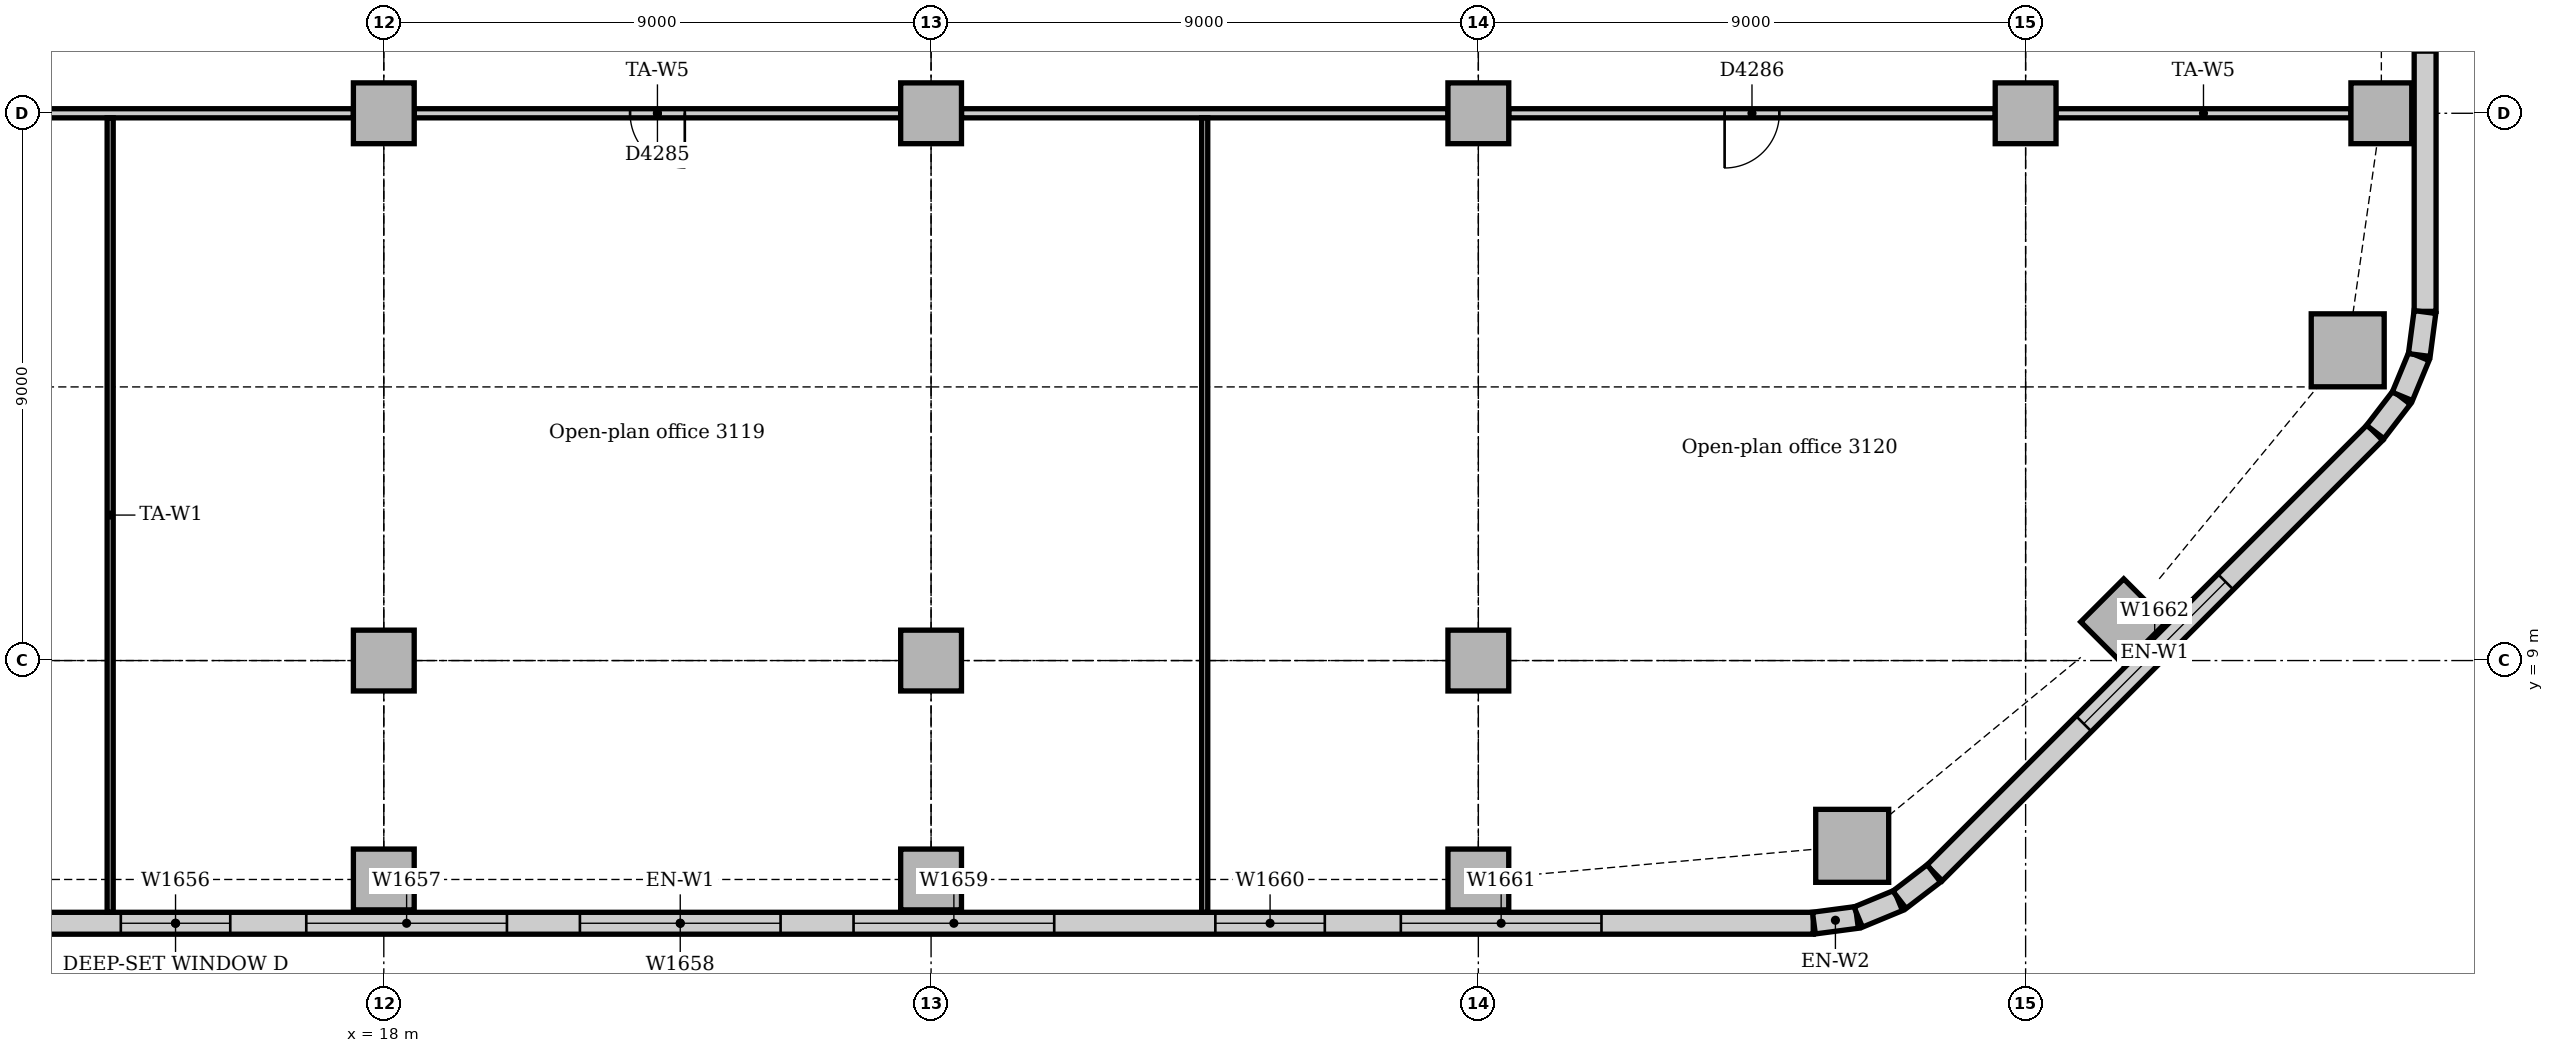
"""IFC4 building model, lengths in metres.
Left out: names, types, materials, properties, quantities, classifications, styles, units other than length and angle.
Written with IfcOpenShell. Run it as: python <this file> out.ifc"""

import sys

from ifc_helpers import new_model, si_unit, direction, frame, frame_2d, origin, origin_2d, place, context, subcontext, project, spatial, rectangle, extrude, element, fill, save


model = new_model("IFC4")
c1 = context("Model", 3, precision=1e-05, world=origin(), true_north=direction((0.0, 1.0)))
c2 = subcontext(c1, "Body", "Model", "MODEL_VIEW")
j1 = project(units=[si_unit("LENGTHUNIT", "METRE"), si_unit("PLANEANGLEUNIT", "RADIAN")], contexts=[c1])
p1 = place(None, origin())
s1 = spatial("IfcSite", under=j1, at=p1, CompositionType="ELEMENT")
p2 = place(p1, origin())
s2 = spatial("IfcBuilding", under=s1, at=p2, CompositionType="ELEMENT")
p3 = place(p2, frame((0.0, 0.0, 132.0)))
s3 = spatial("IfcBuildingStorey", under=s2, at=p3, CompositionType="ELEMENT", Elevation=132.0)
for number, where, z_axis, x_axis in (
    (1, (42.148, 5.953, 0.0), (0.0, 0.0, 1.0), (1.0, 0.0, 0.0)),
    (2, (50.297, 14.102, 0.0), (0.0, 0.0, 1.0), (1.0, 0.0, 0.0)),
):
    element("IfcColumn", number, at=place(p3, frame(where, z_axis=z_axis, x_axis=x_axis)), inside=s3, PredefinedType="COLUMN", context=c2, shape_type="SweptSolid", body=[
        extrude(rectangle(XDim=1.2, YDim=1.2, at=origin_2d()), origin(), (0.0, 0.0, 1.0), 3.85),
    ])
for number, where, z_axis, x_axis in (
    (3, (18.0, 5.4, 0.0), (0.0, 0.0, 1.0), (1.0, 0.0, 0.0)),
    (4, (27.0, 5.4, 0.0), (0.0, 0.0, 1.0), (1.0, 0.0, 0.0)),
    (5, (36.0, 5.4, 0.0), (0.0, 0.0, 1.0), (1.0, 0.0, 0.0)),
    (6, (46.614, 9.636, 0.0), (0.0, 0.0, 1.0), (0.707, 0.707, 0.0)),
    (7, (50.85, 18.0, 0.0), (0.0, 0.0, 1.0), (1.0, 0.0, 0.0)),
    (8, (18.0, 9.0, 0.0), (0.0, 0.0, 1.0), (1.0, 0.0, 0.0)),
    (9, (18.0, 18.0, 0.0), (0.0, 0.0, 1.0), (1.0, 0.0, 0.0)),
    (10, (27.0, 9.0, 0.0), (0.0, 0.0, 1.0), (1.0, 0.0, 0.0)),
    (11, (27.0, 18.0, 0.0), (0.0, 0.0, 1.0), (1.0, 0.0, 0.0)),
    (12, (36.0, 9.0, 0.0), (0.0, 0.0, 1.0), (1.0, 0.0, 0.0)),
    (13, (36.0, 18.0, 0.0), (0.0, 0.0, 1.0), (1.0, 0.0, 0.0)),
    (14, (45.0, 18.0, 0.0), (0.0, 0.0, 1.0), (1.0, 0.0, 0.0)),
):
    element("IfcColumn", number, at=place(p3, frame(where, z_axis=z_axis, x_axis=x_axis)), inside=s3, PredefinedType="COLUMN", context=c2, shape_type="SweptSolid", body=[
        extrude(rectangle(XDim=1.0, YDim=1.0, at=origin_2d()), origin(), (0.0, 0.0, 1.0), 3.85),
    ])
p4 = place(p3, frame((4.243, 4.68, 0.0), z_axis=(0.0, 0.0, 1.0), x_axis=(1.0, 0.0, 0.0)))
e15 = element("IfcWall", 15, at=p4, inside=s3, PredefinedType="STANDARD", context=c2, shape_type="SweptSolid", body=[
    extrude(rectangle(XDim=37.265, YDim=0.36, at=frame_2d((18.632, 0.0))), origin(), (0.0, 0.0, 1.0), 3.85),
])
p5 = place(p4, frame((3.482, 0.0, 0.9)))
e16 = element("IfcOpeningElement", 16, at=p5, cuts=e15, PredefinedType="OPENING", context=c2, shape_type="SweptSolid", body=[
    extrude(rectangle(XDim=3.3, YDim=1.6, at=frame_2d((1.65, 0.8))), frame((0.0, 0.19, 0.0), z_axis=(0.0, -1.0, 0.0), x_axis=(1.0, 0.0, 0.0)), (0.0, 0.0, 1.0), 0.38),
])
p6 = place(p4, frame((9.432, 0.0, 0.9)))
e17 = element("IfcOpeningElement", 17, at=p6, cuts=e15, PredefinedType="OPENING", context=c2, shape_type="SweptSolid", body=[
    extrude(rectangle(XDim=1.8, YDim=1.6, at=frame_2d((0.9, 0.8))), frame((0.0, 0.19, 0.0), z_axis=(0.0, -1.0, 0.0), x_axis=(1.0, 0.0, 0.0)), (0.0, 0.0, 1.0), 0.38),
])
p7 = place(p4, frame((12.482, 0.0, 0.9)))
e18 = element("IfcOpeningElement", 18, at=p7, cuts=e15, PredefinedType="OPENING", context=c2, shape_type="SweptSolid", body=[
    extrude(rectangle(XDim=3.3, YDim=1.6, at=frame_2d((1.65, 0.8))), frame((0.0, 0.19, 0.0), z_axis=(0.0, -1.0, 0.0), x_axis=(1.0, 0.0, 0.0)), (0.0, 0.0, 1.0), 0.38),
])
p8 = place(p4, frame((16.982, 0.0, 0.9)))
e19 = element("IfcOpeningElement", 19, at=p8, cuts=e15, PredefinedType="OPENING", context=c2, shape_type="SweptSolid", body=[
    extrude(rectangle(XDim=3.3, YDim=1.6, at=frame_2d((1.65, 0.8))), frame((0.0, 0.19, 0.0), z_axis=(0.0, -1.0, 0.0), x_axis=(1.0, 0.0, 0.0)), (0.0, 0.0, 1.0), 0.38),
])
p9 = place(p4, frame((21.482, 0.0, 0.9)))
e20 = element("IfcOpeningElement", 20, at=p9, cuts=e15, PredefinedType="OPENING", context=c2, shape_type="SweptSolid", body=[
    extrude(rectangle(XDim=3.3, YDim=1.6, at=frame_2d((1.65, 0.8))), frame((0.0, 0.19, 0.0), z_axis=(0.0, -1.0, 0.0), x_axis=(1.0, 0.0, 0.0)), (0.0, 0.0, 1.0), 0.38),
])
p10 = place(p4, frame((27.432, 0.0, 0.9)))
e21 = element("IfcOpeningElement", 21, at=p10, cuts=e15, PredefinedType="OPENING", context=c2, shape_type="SweptSolid", body=[
    extrude(rectangle(XDim=1.8, YDim=1.6, at=frame_2d((0.9, 0.8))), frame((0.0, 0.19, 0.0), z_axis=(0.0, -1.0, 0.0), x_axis=(1.0, 0.0, 0.0)), (0.0, 0.0, 1.0), 0.38),
])
p11 = place(p4, frame((30.482, 0.0, 0.9)))
e22 = element("IfcOpeningElement", 22, at=p11, cuts=e15, PredefinedType="OPENING", context=c2, shape_type="SweptSolid", body=[
    extrude(rectangle(XDim=3.3, YDim=1.6, at=frame_2d((1.65, 0.8))), frame((0.0, 0.19, 0.0), z_axis=(0.0, -1.0, 0.0), x_axis=(1.0, 0.0, 0.0)), (0.0, 0.0, 1.0), 0.38),
])
p12 = place(p3, frame((43.501, 5.506, 0.0), z_axis=(0.0, 0.0, 1.0), x_axis=(0.707106781187, 0.707106781187, 0.0)))
e23 = element("IfcWall", 23, at=p12, inside=s3, PredefinedType="STANDARD", context=c2, shape_type="SweptSolid", body=[
    extrude(rectangle(XDim=10.243, YDim=0.36, at=frame_2d((5.121, 0.0))), origin(), (0.0, 0.0, 1.0), 3.85),
])
p13 = place(p12, frame((3.471, 0.0, 0.9)))
e24 = element("IfcOpeningElement", 24, at=p13, cuts=e23, PredefinedType="OPENING", context=c2, shape_type="SweptSolid", body=[
    extrude(rectangle(XDim=3.3, YDim=1.6, at=frame_2d((1.65, 0.8))), frame((0.0, 0.19, 0.0), z_axis=(0.0, -1.0, 0.0), x_axis=(1.0, 0.0, 0.0)), (0.0, 0.0, 1.0), 0.38),
])
p14 = place(p3, frame((51.57, 14.743, 0.0), z_axis=(0.0, 0.0, 1.0), x_axis=(0.0, 1.0, 0.0)))
e25 = element("IfcWall", 25, at=p14, inside=s3, PredefinedType="STANDARD", context=c2, shape_type="SweptSolid", body=[
    extrude(rectangle(XDim=24.515, YDim=0.36, at=frame_2d((12.257, 0.0))), origin(), (0.0, 0.0, 1.0), 3.85),
])
p15 = place(p14, frame((4.257, 0.0, 0.9)))
e26 = element("IfcOpeningElement", 26, at=p15, cuts=e25, PredefinedType="OPENING", context=c2, shape_type="SweptSolid", body=[
    extrude(rectangle(XDim=1.8, YDim=1.6, at=frame_2d((0.9, 0.8))), frame((0.0, 0.19, 0.0), z_axis=(0.0, -1.0, 0.0), x_axis=(1.0, 0.0, 0.0)), (0.0, 0.0, 1.0), 0.38),
])
p16 = place(p14, frame((8.357, 0.0, 0.9)))
e27 = element("IfcOpeningElement", 27, at=p16, cuts=e25, PredefinedType="OPENING", context=c2, shape_type="SweptSolid", body=[
    extrude(rectangle(XDim=3.3, YDim=1.6, at=frame_2d((1.65, 0.8))), frame((0.0, 0.19, 0.0), z_axis=(0.0, -1.0, 0.0), x_axis=(1.0, 0.0, 0.0)), (0.0, 0.0, 1.0), 0.38),
])
p17 = place(p14, frame((12.857, 0.0, 0.9)))
e28 = element("IfcOpeningElement", 28, at=p17, cuts=e25, PredefinedType="OPENING", context=c2, shape_type="SweptSolid", body=[
    extrude(rectangle(XDim=3.3, YDim=1.6, at=frame_2d((1.65, 0.8))), frame((0.0, 0.19, 0.0), z_axis=(0.0, -1.0, 0.0), x_axis=(1.0, 0.0, 0.0)), (0.0, 0.0, 1.0), 0.38),
])
p18 = place(p14, frame((17.357, 0.0, 0.9)))
e29 = element("IfcOpeningElement", 29, at=p18, cuts=e25, PredefinedType="OPENING", context=c2, shape_type="SweptSolid", body=[
    extrude(rectangle(XDim=3.3, YDim=1.6, at=frame_2d((1.65, 0.8))), frame((0.0, 0.19, 0.0), z_axis=(0.0, -1.0, 0.0), x_axis=(1.0, 0.0, 0.0)), (0.0, 0.0, 1.0), 0.38),
])
for number, where, z_axis, x_axis in (
    (30, (41.519, 4.683, 0.0), (0.0, 0.0, 1.0), (0.991, 0.131, 0.0)),
    (31, (42.247, 4.782, 0.0), (0.0, 0.0, 1.0), (0.924, 0.383, 0.0)),
):
    element("IfcWall", number, at=place(p3, frame(where, z_axis=z_axis, x_axis=x_axis)), inside=s3, PredefinedType="STANDARD", context=c2, shape_type="SweptSolid", body=[
        extrude(rectangle(XDim=0.713, YDim=0.36, at=frame_2d((0.356, 0.0))), origin(), (0.0, 0.0, 1.0), 3.85),
    ])
for number, where, z_axis, x_axis in (
    (32, (42.925, 5.066, 0.0), (0.0, 0.0, 1.0), (0.793, 0.609, 0.0)),
    (33, (50.75, 12.759, 0.0), (0.0, 0.0, 1.0), (0.609, 0.793, 0.0)),
):
    element("IfcWall", number, at=place(p3, frame(where, z_axis=z_axis, x_axis=x_axis)), inside=s3, PredefinedType="STANDARD", context=c2, shape_type="SweptSolid", body=[
        extrude(rectangle(XDim=0.713, YDim=0.36, at=frame_2d((0.357, 0.0))), origin(), (0.0, 0.0, 1.0), 3.85),
    ])
for number, where, z_axis, x_axis in (
    (34, (51.195, 13.344, 0.0), (0.0, 0.0, 1.0), (0.383, 0.924, 0.0)),
    (35, (51.474, 14.024, 0.0), (0.0, 0.0, 1.0), (0.131, 0.991, 0.0)),
):
    element("IfcWall", number, at=place(p3, frame(where, z_axis=z_axis, x_axis=x_axis)), inside=s3, PredefinedType="STANDARD", context=c2, shape_type="SweptSolid", body=[
        extrude(rectangle(XDim=0.713, YDim=0.36, at=frame_2d((0.356, 0.0))), origin(), (0.0, 0.0, 1.0), 3.85),
    ])
p19 = place(p3, frame((45.5, 18.0, 0.0), z_axis=(0.0, 0.0, 1.0), x_axis=(1.0, 0.0, 0.0)))
e36 = element("IfcWall", 36, at=p19, inside=s3, PredefinedType="PARTITIONING", context=c2, shape_type="SweptSolid", body=[
    extrude(rectangle(XDim=4.85, YDim=0.15, at=frame_2d((2.425, 0.0))), origin(), (0.0, 0.0, 1.0), 3.254),
])
p20 = place(p3, frame((36.5, 18.0, 0.0), z_axis=(0.0, 0.0, 1.0), x_axis=(1.0, 0.0, 0.0)))
e37 = element("IfcWall", 37, at=p20, inside=s3, PredefinedType="PARTITIONING", context=c2, shape_type="SweptSolid", body=[
    extrude(rectangle(XDim=8.0, YDim=0.15, at=frame_2d((4.0, 0.0))), origin(), (0.0, 0.0, 1.0), 3.158),
])
p21 = place(p20, frame((3.55, 0.0, 0.0)))
e38 = element("IfcOpeningElement", 38, at=p21, cuts=e37, PredefinedType="OPENING", context=c2, shape_type="SweptSolid", body=[
    extrude(rectangle(XDim=0.9, YDim=2.1, at=frame_2d((0.45, 1.05))), frame((0.0, 0.085, 0.0), z_axis=(0.0, -1.0, 0.0), x_axis=(1.0, 0.0, 0.0)), (0.0, 0.0, 1.0), 0.17),
])
p22 = place(p3, frame((27.5, 18.0, 0.0), z_axis=(0.0, 0.0, 1.0), x_axis=(1.0, 0.0, 0.0)))
e39 = element("IfcWall", 39, at=p22, inside=s3, PredefinedType="PARTITIONING", context=c2, shape_type="SweptSolid", body=[
    extrude(rectangle(XDim=8.0, YDim=0.15, at=frame_2d((4.0, 0.0))), origin(), (0.0, 0.0, 1.0), 3.158),
])
p23 = place(p3, frame((18.5, 18.0, 0.0), z_axis=(0.0, 0.0, 1.0), x_axis=(1.0, 0.0, 0.0)))
e40 = element("IfcWall", 40, at=p23, inside=s3, PredefinedType="PARTITIONING", context=c2, shape_type="SweptSolid", body=[
    extrude(rectangle(XDim=8.0, YDim=0.15, at=frame_2d((4.0, 0.0))), origin(), (0.0, 0.0, 1.0), 3.158),
])
p24 = place(p23, frame((3.55, 0.0, 0.0)))
e41 = element("IfcOpeningElement", 41, at=p24, cuts=e40, PredefinedType="OPENING", context=c2, shape_type="SweptSolid", body=[
    extrude(rectangle(XDim=0.9, YDim=2.1, at=frame_2d((0.45, 1.05))), frame((0.0, 0.085, 0.0), z_axis=(0.0, -1.0, 0.0), x_axis=(1.0, 0.0, 0.0)), (0.0, 0.0, 1.0), 0.17),
])
p25 = place(p3, frame((9.5, 18.0, 0.0), z_axis=(0.0, 0.0, 1.0), x_axis=(1.0, 0.0, 0.0)))
e42 = element("IfcWall", 42, at=p25, inside=s3, PredefinedType="PARTITIONING", context=c2, shape_type="SweptSolid", body=[
    extrude(rectangle(XDim=8.0, YDim=0.15, at=frame_2d((4.0, 0.0))), origin(), (0.0, 0.0, 1.0), 3.158),
])
for number, where, z_axis, x_axis in (
    (43, (13.5, 4.86, 0.0), (0.0, 0.0, 1.0), (0.0, 1.0, 0.0)),
    (44, (31.5, 4.86, 0.0), (0.0, 0.0, 1.0), (0.0, 1.0, 0.0)),
):
    element("IfcWall", number, at=place(p3, frame(where, z_axis=z_axis, x_axis=x_axis)), inside=s3, PredefinedType="PARTITIONING", context=c2, shape_type="SweptSolid", body=[
        extrude(rectangle(XDim=13.065, YDim=0.1, at=frame_2d((6.532, 0.0))), origin(), (0.0, 0.0, 1.0), 3.85),
    ])
p26 = place(p6, origin())
e45 = element("IfcWindow", 45, at=p26, inside=s3, PartitioningType="SINGLE_PANEL", PredefinedType="WINDOW", context=c2, shape_type="SweptSolid", body=[
    extrude(rectangle(XDim=1.8, YDim=1.6, at=frame_2d((0.9, 0.8))), frame((0.0, 0.13, 0.0), z_axis=(0.0, -1.0, 0.0), x_axis=(1.0, 0.0, 0.0)), (0.0, 0.0, 1.0), 0.06),
])
fill(e17, e45)
p27 = place(p7, origin())
e46 = element("IfcWindow", 46, at=p27, inside=s3, PartitioningType="SINGLE_PANEL", PredefinedType="WINDOW", context=c2, shape_type="SweptSolid", body=[
    extrude(rectangle(XDim=3.3, YDim=1.6, at=frame_2d((1.65, 0.8))), frame((0.0, 0.13, 0.0), z_axis=(0.0, -1.0, 0.0), x_axis=(1.0, 0.0, 0.0)), (0.0, 0.0, 1.0), 0.06),
])
fill(e18, e46)
p28 = place(p8, origin())
e47 = element("IfcWindow", 47, at=p28, inside=s3, PartitioningType="SINGLE_PANEL", PredefinedType="WINDOW", context=c2, shape_type="SweptSolid", body=[
    extrude(rectangle(XDim=3.3, YDim=1.6, at=frame_2d((1.65, 0.8))), frame((0.0, 0.13, 0.0), z_axis=(0.0, -1.0, 0.0), x_axis=(1.0, 0.0, 0.0)), (0.0, 0.0, 1.0), 0.06),
])
fill(e19, e47)
p29 = place(p9, origin())
e48 = element("IfcWindow", 48, at=p29, inside=s3, PartitioningType="SINGLE_PANEL", PredefinedType="WINDOW", context=c2, shape_type="SweptSolid", body=[
    extrude(rectangle(XDim=3.3, YDim=1.6, at=frame_2d((1.65, 0.8))), frame((0.0, 0.13, 0.0), z_axis=(0.0, -1.0, 0.0), x_axis=(1.0, 0.0, 0.0)), (0.0, 0.0, 1.0), 0.06),
])
fill(e20, e48)
p30 = place(p10, origin())
e49 = element("IfcWindow", 49, at=p30, inside=s3, PartitioningType="SINGLE_PANEL", PredefinedType="WINDOW", context=c2, shape_type="SweptSolid", body=[
    extrude(rectangle(XDim=1.8, YDim=1.6, at=frame_2d((0.9, 0.8))), frame((0.0, 0.13, 0.0), z_axis=(0.0, -1.0, 0.0), x_axis=(1.0, 0.0, 0.0)), (0.0, 0.0, 1.0), 0.06),
])
fill(e21, e49)
p31 = place(p11, origin())
e50 = element("IfcWindow", 50, at=p31, inside=s3, PartitioningType="SINGLE_PANEL", PredefinedType="WINDOW", context=c2, shape_type="SweptSolid", body=[
    extrude(rectangle(XDim=3.3, YDim=1.6, at=frame_2d((1.65, 0.8))), frame((0.0, 0.13, 0.0), z_axis=(0.0, -1.0, 0.0), x_axis=(1.0, 0.0, 0.0)), (0.0, 0.0, 1.0), 0.06),
])
fill(e22, e50)
p32 = place(p13, origin())
e51 = element("IfcWindow", 51, at=p32, inside=s3, PartitioningType="SINGLE_PANEL", PredefinedType="WINDOW", context=c2, shape_type="SweptSolid", body=[
    extrude(rectangle(XDim=3.3, YDim=1.6, at=frame_2d((1.65, 0.8))), frame((0.0, 0.13, 0.0), z_axis=(0.0, -1.0, 0.0), x_axis=(1.0, 0.0, 0.0)), (0.0, 0.0, 1.0), 0.06),
])
fill(e24, e51)
p33 = place(p24, frame((0.9, 0.0, 0.0), z_axis=(0.0, 0.0, 1.0), x_axis=(-1.0, 0.0, 0.0)))
e52 = element("IfcDoor", 52, at=p33, inside=s3, OperationType="SINGLE_SWING_LEFT", PredefinedType="DOOR", context=c2, shape_type="SweptSolid", body=[
    extrude(rectangle(XDim=0.9, YDim=2.1, at=frame_2d((0.45, 1.05))), frame((0.0, 0.025, 0.0), z_axis=(0.0, -1.0, 0.0), x_axis=(1.0, 0.0, 0.0)), (0.0, 0.0, 1.0), 0.05),
])
fill(e41, e52)
p34 = place(p21, frame((0.9, 0.0, 0.0), z_axis=(0.0, 0.0, 1.0), x_axis=(-1.0, 0.0, 0.0)))
e53 = element("IfcDoor", 53, at=p34, inside=s3, OperationType="SINGLE_SWING_RIGHT", PredefinedType="DOOR", context=c2, shape_type="SweptSolid", body=[
    extrude(rectangle(XDim=0.9, YDim=2.1, at=frame_2d((0.45, 1.05))), frame((0.0, 0.025, 0.0), z_axis=(0.0, -1.0, 0.0), x_axis=(1.0, 0.0, 0.0)), (0.0, 0.0, 1.0), 0.05),
])
fill(e38, e53)
save(model, sys.argv[1])
